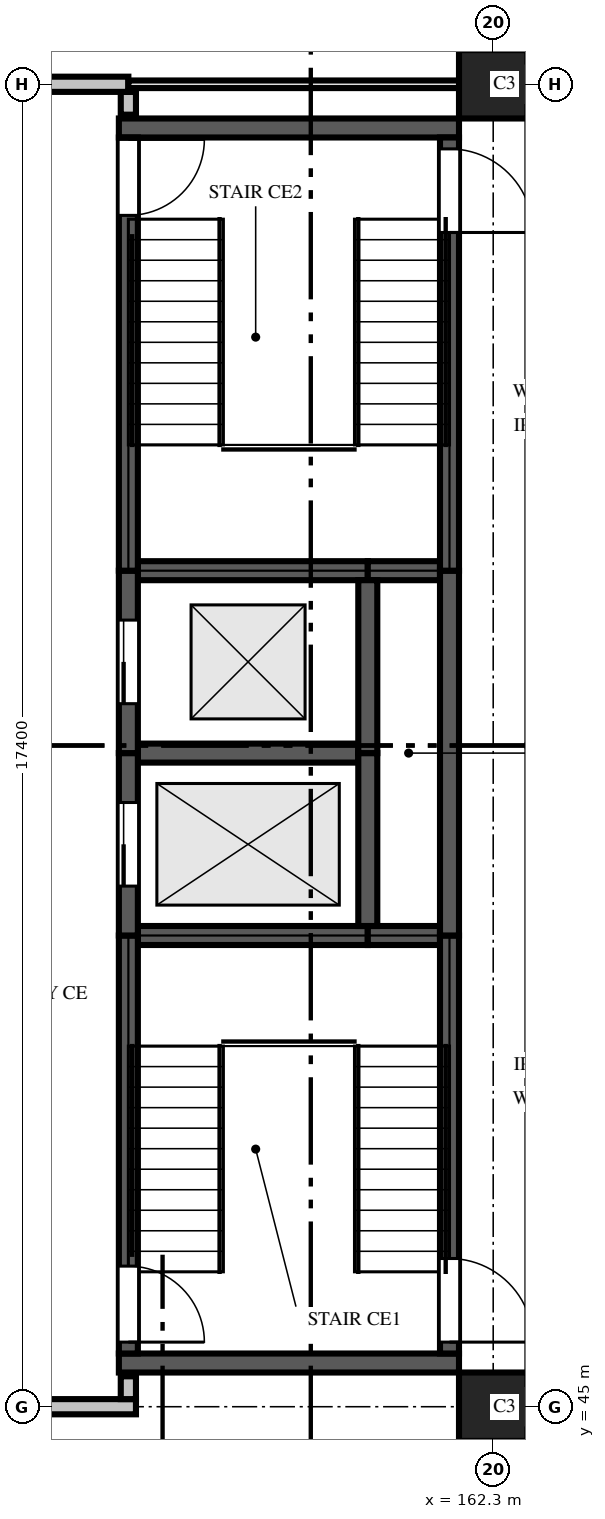
"""IFC4 building model, lengths in metres.
Left out: names, types, materials, properties, quantities, classifications, styles, units other than length and angle.
Written with IfcOpenShell. Run it as: python <this file> out.ifc"""

import sys

from ifc_helpers import new_model, si_unit, direction, frame, frame_2d, origin, place, context, subcontext, project, spatial, polyline, rectangle, outline, extrude, element, fill, save


model = new_model("IFC4")
c1 = context("Model", 3, precision=1e-05, world=origin(), true_north=direction((0.0, 1.0)))
c2 = subcontext(c1, "Body", "Model", "MODEL_VIEW")
j1 = project(units=[si_unit("LENGTHUNIT", "METRE"), si_unit("PLANEANGLEUNIT", "RADIAN")], contexts=[c1])
p1 = place(None, origin())
s1 = spatial("IfcSite", under=j1, at=p1, CompositionType="ELEMENT")
p2 = place(p1, origin())
s2 = spatial("IfcBuilding", under=s1, at=p2, CompositionType="ELEMENT")
p3 = place(p2, origin())
s3 = spatial("IfcBuildingStorey", under=s2, at=p3, CompositionType="ELEMENT", Elevation=0.0)
for number, where, z_axis, x_axis in (
    (1, (162.3, 45.0, 0.0), (0.0, 0.0, 1.0), (1.0, 0.0, 0.0)),
    (2, (162.3, 62.4, 0.0), (0.0, 0.0, 1.0), (1.0, 0.0, 0.0)),
):
    element("IfcColumn", number, at=place(p3, frame(where, z_axis=z_axis, x_axis=x_axis)), inside=s3, PredefinedType="COLUMN", context=c2, shape_type="SweptSolid", body=[
        extrude(outline(polyline([(-0.45, -0.45), (0.45, -0.45), (0.45, -0.3), (0.75, -0.3), (0.75, 0.3), (0.45, 0.3), (0.45, 0.45), (-0.45, 0.45), (-0.45, -0.45)])), origin(), (0.0, 0.0, 1.0), 4.5),
    ])
p4 = place(p3, frame((157.375, 45.575, 0.0), z_axis=(0.0, 0.0, 1.0), x_axis=(1.0, 0.0, 0.0)))
e3 = element("IfcWall", 3, at=p4, inside=s3, PredefinedType="SHEAR", context=c2, shape_type="SweptSolid", body=[
    extrude(rectangle(XDim=4.475, YDim=0.25, at=frame_2d((2.238, 0.0))), origin(), (0.0, 0.0, 1.0), 4.5),
])
p5 = place(p3, frame((157.625, 51.2, 0.0), z_axis=(0.0, 0.0, 1.0), x_axis=(1.0, 0.0, 0.0)))
e4 = element("IfcWall", 4, at=p5, inside=s3, PredefinedType="SHEAR", context=c2, shape_type="SweptSolid", body=[
    extrude(rectangle(XDim=3.025, YDim=0.25, at=frame_2d((1.512, 0.0))), origin(), (0.0, 0.0, 1.0), 4.5),
])
p6 = place(p3, frame((160.65, 51.2, 0.0), z_axis=(0.0, 0.0, 1.0), x_axis=(1.0, 0.0, 0.0)))
e5 = element("IfcWall", 5, at=p6, inside=s3, PredefinedType="SHEAR", context=c2, shape_type="SweptSolid", body=[
    extrude(rectangle(XDim=0.95, YDim=0.25, at=frame_2d((0.475, 0.0))), origin(), (0.0, 0.0, 1.0), 4.5),
])
p7 = place(p3, frame((157.625, 53.6, -1.4), z_axis=(0.0, 0.0, 1.0), x_axis=(1.0, 0.0, 0.0)))
e6 = element("IfcWall", 6, at=p7, inside=s3, PredefinedType="SHEAR", context=c2, shape_type="SweptSolid", body=[
    extrude(rectangle(XDim=2.9, YDim=0.25, at=frame_2d((1.45, 0.0))), origin(), (0.0, 0.0, 1.0), 5.9),
])
p8 = place(p3, frame((157.625, 56.0, 0.0), z_axis=(0.0, 0.0, 1.0), x_axis=(1.0, 0.0, 0.0)))
e7 = element("IfcWall", 7, at=p8, inside=s3, PredefinedType="SHEAR", context=c2, shape_type="SweptSolid", body=[
    extrude(rectangle(XDim=3.025, YDim=0.25, at=frame_2d((1.512, 0.0))), origin(), (0.0, 0.0, 1.0), 4.5),
])
p9 = place(p3, frame((160.65, 56.0, 0.0), z_axis=(0.0, 0.0, 1.0), x_axis=(1.0, 0.0, 0.0)))
e8 = element("IfcWall", 8, at=p9, inside=s3, PredefinedType="SHEAR", context=c2, shape_type="SweptSolid", body=[
    extrude(rectangle(XDim=0.95, YDim=0.25, at=frame_2d((0.475, 0.0))), origin(), (0.0, 0.0, 1.0), 4.5),
])
p10 = place(p3, frame((157.375, 61.825, 0.0), z_axis=(0.0, 0.0, 1.0), x_axis=(1.0, 0.0, 0.0)))
e9 = element("IfcWall", 9, at=p10, inside=s3, PredefinedType="SHEAR", context=c2, shape_type="SweptSolid", body=[
    extrude(rectangle(XDim=4.475, YDim=0.25, at=frame_2d((2.238, 0.0))), origin(), (0.0, 0.0, 1.0), 4.5),
])
p11 = place(p3, frame((157.5, 45.7, 0.0), z_axis=(0.0, 0.0, 1.0), x_axis=(0.0, 1.0, 0.0)))
e10 = element("IfcWall", 10, at=p11, inside=s3, PredefinedType="SHEAR", context=c2, shape_type="SweptSolid", body=[
    extrude(rectangle(XDim=5.5, YDim=0.25, at=frame_2d((2.75, 0.0))), origin(), (0.0, 0.0, 1.0), 4.5),
])
p12 = place(p11, frame((0.15, 0.0, 0.0)))
e11 = element("IfcOpeningElement", 11, at=p12, cuts=e10, PredefinedType="OPENING", context=c2, shape_type="SweptSolid", body=[
    extrude(rectangle(XDim=1.0, YDim=2.1, at=frame_2d((0.5, 1.05))), frame((0.0, 0.135, 0.0), z_axis=(0.0, -1.0, 0.0), x_axis=(1.0, 0.0, 0.0)), (0.0, 0.0, 1.0), 0.27),
])
p13 = place(p3, frame((157.5, 51.2, -1.4), z_axis=(0.0, 0.0, 1.0), x_axis=(0.0, 1.0, 0.0)))
e12 = element("IfcWall", 12, at=p13, inside=s3, PredefinedType="SHEAR", context=c2, shape_type="SweptSolid", body=[
    extrude(rectangle(XDim=2.4, YDim=0.25, at=frame_2d((1.2, 0.0))), origin(), (0.0, 0.0, 1.0), 5.9),
])
p14 = place(p13, frame((0.65, 0.0, 1.4)))
e13 = element("IfcOpeningElement", 13, at=p14, cuts=e12, PredefinedType="OPENING", context=c2, shape_type="SweptSolid", body=[
    extrude(rectangle(XDim=1.1, YDim=2.1, at=frame_2d((0.55, 1.05))), frame((0.0, 0.135, 0.0), z_axis=(0.0, -1.0, 0.0), x_axis=(1.0, 0.0, 0.0)), (0.0, 0.0, 1.0), 0.27),
])
p15 = place(p3, frame((157.5, 53.6, -1.4), z_axis=(0.0, 0.0, 1.0), x_axis=(0.0, 1.0, 0.0)))
e14 = element("IfcWall", 14, at=p15, inside=s3, PredefinedType="SHEAR", context=c2, shape_type="SweptSolid", body=[
    extrude(rectangle(XDim=2.4, YDim=0.25, at=frame_2d((1.2, 0.0))), origin(), (0.0, 0.0, 1.0), 5.9),
])
p16 = place(p15, frame((0.65, 0.0, 1.4)))
e15 = element("IfcOpeningElement", 15, at=p16, cuts=e14, PredefinedType="OPENING", context=c2, shape_type="SweptSolid", body=[
    extrude(rectangle(XDim=1.1, YDim=2.1, at=frame_2d((0.55, 1.05))), frame((0.0, 0.135, 0.0), z_axis=(0.0, -1.0, 0.0), x_axis=(1.0, 0.0, 0.0)), (0.0, 0.0, 1.0), 0.27),
])
p17 = place(p3, frame((157.5, 56.0, 0.0), z_axis=(0.0, 0.0, 1.0), x_axis=(0.0, 1.0, 0.0)))
e16 = element("IfcWall", 16, at=p17, inside=s3, PredefinedType="SHEAR", context=c2, shape_type="SweptSolid", body=[
    extrude(rectangle(XDim=5.7, YDim=0.25, at=frame_2d((2.85, 0.0))), origin(), (0.0, 0.0, 1.0), 4.5),
])
p18 = place(p17, frame((4.675, 0.0, 0.0)))
e17 = element("IfcOpeningElement", 17, at=p18, cuts=e16, PredefinedType="OPENING", context=c2, shape_type="SweptSolid", body=[
    extrude(rectangle(XDim=1.0, YDim=2.1, at=frame_2d((0.5, 1.05))), frame((0.0, 0.135, 0.0), z_axis=(0.0, -1.0, 0.0), x_axis=(1.0, 0.0, 0.0)), (0.0, 0.0, 1.0), 0.27),
])
p19 = place(p3, frame((160.65, 51.325, -1.4), z_axis=(0.0, 0.0, 1.0), x_axis=(0.0, 1.0, 0.0)))
e18 = element("IfcWall", 18, at=p19, inside=s3, PredefinedType="SHEAR", context=c2, shape_type="SweptSolid", body=[
    extrude(rectangle(XDim=2.275, YDim=0.25, at=frame_2d((1.138, 0.0))), origin(), (0.0, 0.0, 1.0), 5.9),
])
p20 = place(p3, frame((160.65, 53.6, -1.4), z_axis=(0.0, 0.0, 1.0), x_axis=(0.0, 1.0, 0.0)))
e19 = element("IfcWall", 19, at=p20, inside=s3, PredefinedType="SHEAR", context=c2, shape_type="SweptSolid", body=[
    extrude(rectangle(XDim=2.275, YDim=0.25, at=frame_2d((1.137, 0.0))), origin(), (0.0, 0.0, 1.0), 5.9),
])
p21 = place(p3, frame((161.725, 45.7, 0.0), z_axis=(0.0, 0.0, 1.0), x_axis=(0.0, 1.0, 0.0)))
e20 = element("IfcWall", 20, at=p21, inside=s3, PredefinedType="SHEAR", context=c2, shape_type="SweptSolid", body=[
    extrude(rectangle(XDim=5.5, YDim=0.25, at=frame_2d((2.75, 0.0))), origin(), (0.0, 0.0, 1.0), 4.5),
])
p22 = place(p21, frame((0.15, 0.0, 0.0)))
e21 = element("IfcOpeningElement", 21, at=p22, cuts=e20, PredefinedType="OPENING", context=c2, shape_type="SweptSolid", body=[
    extrude(rectangle(XDim=1.1, YDim=2.1, at=frame_2d((0.55, 1.05))), frame((0.0, 0.135, 0.0), z_axis=(0.0, -1.0, 0.0), x_axis=(1.0, 0.0, 0.0)), (0.0, 0.0, 1.0), 0.27),
])
p23 = place(p3, frame((161.725, 51.2, 0.0), z_axis=(0.0, 0.0, 1.0), x_axis=(0.0, 1.0, 0.0)))
e22 = element("IfcWall", 22, at=p23, inside=s3, PredefinedType="SHEAR", context=c2, shape_type="SweptSolid", body=[
    extrude(rectangle(XDim=4.8, YDim=0.25, at=frame_2d((2.4, 0.0))), origin(), (0.0, 0.0, 1.0), 4.5),
])
p24 = place(p3, frame((161.725, 56.0, 0.0), z_axis=(0.0, 0.0, 1.0), x_axis=(0.0, 1.0, 0.0)))
e23 = element("IfcWall", 23, at=p24, inside=s3, PredefinedType="SHEAR", context=c2, shape_type="SweptSolid", body=[
    extrude(rectangle(XDim=5.7, YDim=0.25, at=frame_2d((2.85, 0.0))), origin(), (0.0, 0.0, 1.0), 4.5),
])
p25 = place(p24, frame((4.45, 0.0, 0.0)))
e24 = element("IfcOpeningElement", 24, at=p25, cuts=e23, PredefinedType="OPENING", context=c2, shape_type="SweptSolid", body=[
    extrude(rectangle(XDim=1.1, YDim=2.1, at=frame_2d((0.55, 1.05))), frame((0.0, 0.135, 0.0), z_axis=(0.0, -1.0, 0.0), x_axis=(1.0, 0.0, 0.0)), (0.0, 0.0, 1.0), 0.27),
])
p26 = place(p3, frame((153.3, 45.0, 0.0), z_axis=(0.0, 0.0, 1.0), x_axis=(1.0, 0.0, 0.0)))
e25 = element("IfcWall", 25, at=p26, inside=s3, PredefinedType="PARTITIONING", context=c2, shape_type="SweptSolid", body=[
    extrude(rectangle(XDim=4.3, YDim=0.2, at=frame_2d((2.15, 0.0))), origin(), (0.0, 0.0, 1.0), 3.68),
])
p27 = place(p3, frame((157.5, 45.1, 0.0), z_axis=(0.0, 0.0, 1.0), x_axis=(0.0, 1.0, 0.0)))
e26 = element("IfcWall", 26, at=p27, inside=s3, PredefinedType="PARTITIONING", context=c2, shape_type="SweptSolid", body=[
    extrude(rectangle(XDim=0.3, YDim=0.2, at=frame_2d((0.15, 0.0))), origin(), (0.0, 0.0, 1.0), 3.68),
])
p28 = place(p3, frame((157.5, 62.0, 0.0), z_axis=(0.0, 0.0, 1.0), x_axis=(0.0, 1.0, 0.0)))
e27 = element("IfcWall", 27, at=p28, inside=s3, PredefinedType="PARTITIONING", context=c2, shape_type="SweptSolid", body=[
    extrude(rectangle(XDim=0.3, YDim=0.2, at=frame_2d((0.15, 0.0))), origin(), (0.0, 0.0, 1.0), 3.68),
])
p29 = place(p3, frame((157.5, 62.4, 0.0), z_axis=(0.0, 0.0, 1.0), x_axis=(-1.0, 0.0, 0.0)))
e28 = element("IfcWall", 28, at=p29, inside=s3, PredefinedType="PARTITIONING", context=c2, shape_type="SweptSolid", body=[
    extrude(rectangle(XDim=4.2, YDim=0.2, at=frame_2d((2.1, 0.0))), origin(), (0.0, 0.0, 1.0), 3.68),
])
p30 = place(p3, frame((157.5, 62.4, 0.0), z_axis=(0.0, 0.0, 1.0), x_axis=(1.0, 0.0, 0.0)))
e29 = element("IfcWall", 29, at=p30, inside=s3, PredefinedType="PARTITIONING", context=c2, shape_type="SweptSolid", body=[
    extrude(rectangle(XDim=4.74, YDim=0.1, at=frame_2d((2.37, 0.0))), origin(), (0.0, 0.0, 1.0), 3.68),
])
p31 = place(p22, frame((1.1, 0.0, 0.0), z_axis=(0.0, 0.0, 1.0), x_axis=(-1.0, 0.0, 0.0)))
e30 = element("IfcDoor", 30, at=p31, inside=s3, OperationType="SINGLE_SWING_LEFT", PredefinedType="DOOR", context=c2, shape_type="SweptSolid", body=[
    extrude(rectangle(XDim=1.1, YDim=2.1, at=frame_2d((0.55, 1.05))), frame((0.0, 0.025, 0.0), z_axis=(0.0, -1.0, 0.0), x_axis=(1.0, 0.0, 0.0)), (0.0, 0.0, 1.0), 0.05),
])
fill(e21, e30)
p32 = place(p25, frame((1.1, 0.0, 0.0), z_axis=(0.0, 0.0, 1.0), x_axis=(-1.0, 0.0, 0.0)))
e31 = element("IfcDoor", 31, at=p32, inside=s3, OperationType="SINGLE_SWING_LEFT", PredefinedType="DOOR", context=c2, shape_type="SweptSolid", body=[
    extrude(rectangle(XDim=1.1, YDim=2.1, at=frame_2d((0.55, 1.05))), frame((0.0, 0.025, 0.0), z_axis=(0.0, -1.0, 0.0), x_axis=(1.0, 0.0, 0.0)), (0.0, 0.0, 1.0), 0.05),
])
fill(e24, e31)
p33 = place(p14, origin())
e32 = element("IfcDoor", 32, at=p33, inside=s3, OperationType="SLIDING_TO_LEFT", PredefinedType="DOOR", context=c2, shape_type="SweptSolid", body=[
    extrude(rectangle(XDim=1.1, YDim=2.1, at=frame_2d((0.55, 1.05))), frame((0.0, 0.025, 0.0), z_axis=(0.0, -1.0, 0.0), x_axis=(1.0, 0.0, 0.0)), (0.0, 0.0, 1.0), 0.05),
])
fill(e13, e32)
p34 = place(p16, origin())
e33 = element("IfcDoor", 33, at=p34, inside=s3, OperationType="SLIDING_TO_LEFT", PredefinedType="DOOR", context=c2, shape_type="SweptSolid", body=[
    extrude(rectangle(XDim=1.1, YDim=2.1, at=frame_2d((0.55, 1.05))), frame((0.0, 0.025, 0.0), z_axis=(0.0, -1.0, 0.0), x_axis=(1.0, 0.0, 0.0)), (0.0, 0.0, 1.0), 0.05),
])
fill(e15, e33)
p35 = place(p18, origin())
e34 = element("IfcDoor", 34, at=p35, inside=s3, OperationType="SINGLE_SWING_RIGHT", PredefinedType="DOOR", context=c2, shape_type="SweptSolid", body=[
    extrude(rectangle(XDim=1.0, YDim=2.1, at=frame_2d((0.5, 1.05))), frame((0.0, 0.025, 0.0), z_axis=(0.0, -1.0, 0.0), x_axis=(1.0, 0.0, 0.0)), (0.0, 0.0, 1.0), 0.05),
])
fill(e17, e34)
p36 = place(p12, origin())
e35 = element("IfcDoor", 35, at=p36, inside=s3, OperationType="SINGLE_SWING_LEFT", PredefinedType="DOOR", context=c2, shape_type="SweptSolid", body=[
    extrude(rectangle(XDim=1.0, YDim=2.1, at=frame_2d((0.5, 1.05))), frame((0.0, 0.025, 0.0), z_axis=(0.0, -1.0, 0.0), x_axis=(1.0, 0.0, 0.0)), (0.0, 0.0, 1.0), 0.05),
])
fill(e11, e35)
save(model, sys.argv[1])
